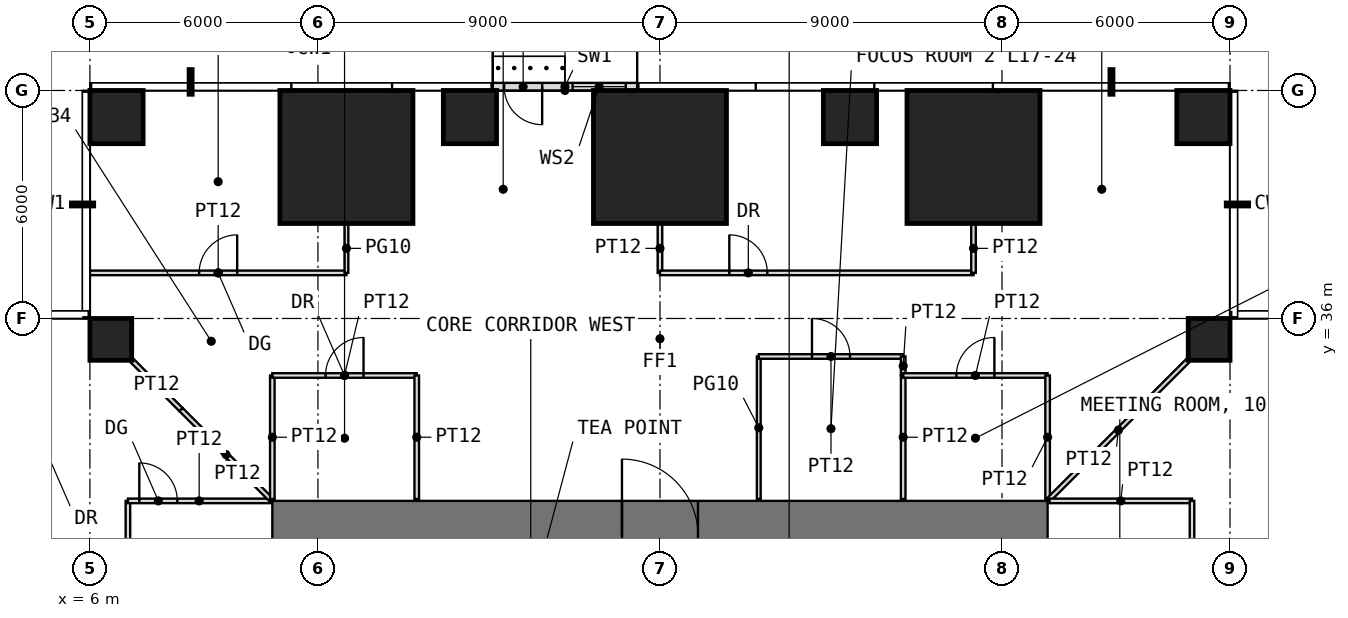
"""IFC4 building model, lengths in metres.
Left out: names, types, materials, properties, quantities, classifications, styles, units other than length and angle.
Written with IfcOpenShell. Run it as: python <this file> out.ifc"""

import sys

from ifc_helpers import new_model, si_unit, direction, frame, frame_2d, origin, origin_2d, place, context, subcontext, project, spatial, rectangle, extrude, element, fill, save


model = new_model("IFC4")
c1 = context("Model", 3, precision=1e-05, world=origin(), true_north=direction((0.0, 1.0)))
c2 = subcontext(c1, "Body", "Model", "MODEL_VIEW")
j1 = project(units=[si_unit("LENGTHUNIT", "METRE"), si_unit("PLANEANGLEUNIT", "RADIAN")], contexts=[c1])
p1 = place(None, origin())
s1 = spatial("IfcSite", under=j1, at=p1, CompositionType="ELEMENT")
p2 = place(p1, origin())
s2 = spatial("IfcBuilding", under=s1, at=p2, CompositionType="ELEMENT")
p3 = place(p2, frame((0.0, 0.0, 74.5)))
s3 = spatial("IfcBuildingStorey", under=s2, at=p3, CompositionType="ELEMENT", Elevation=74.5)
for number, where, z_axis, x_axis in (
    (1, (6.55, 35.45, 0.0), (0.0, 0.0, 1.0), (1.0, 0.0, 0.0)),
    (2, (35.45, 35.45, 0.0), (0.0, 0.0, 1.0), (1.0, 0.0, 0.0)),
):
    element("IfcColumn", number, at=place(p3, frame(where, z_axis=z_axis, x_axis=x_axis)), inside=s3, PredefinedType="COLUMN", context=c2, shape_type="SweptSolid", body=[
        extrude(rectangle(XDim=1.1, YDim=1.1, at=origin_2d()), origin(), (0.0, 0.0, 1.0), 4.0),
    ])
p4 = place(p3, frame((6.7, 41.3, 0.0), z_axis=(0.0, 0.0, 1.0), x_axis=(1.0, 0.0, 0.0)))
e3 = element("IfcColumn", 3, at=p4, inside=s3, PredefinedType="COLUMN", context=c2, shape_type="SweptSolid", body=[
    extrude(rectangle(XDim=1.4, YDim=1.4, at=origin_2d()), origin(), (0.0, 0.0, 1.0), 4.0),
])
p5 = place(p3, frame((12.75, 40.25, 0.0), z_axis=(0.0, 0.0, 1.0), x_axis=(1.0, 0.0, 0.0)))
e4 = element("IfcColumn", 4, at=p5, inside=s3, PredefinedType="COLUMN", context=c2, shape_type="SweptSolid", body=[
    extrude(rectangle(XDim=3.5, YDim=3.5, at=origin_2d()), origin(), (0.0, 0.0, 1.0), 4.0),
])
p6 = place(p3, frame((16.0, 41.3, 0.0), z_axis=(0.0, 0.0, 1.0), x_axis=(1.0, 0.0, 0.0)))
e5 = element("IfcColumn", 5, at=p6, inside=s3, PredefinedType="COLUMN", context=c2, shape_type="SweptSolid", body=[
    extrude(rectangle(XDim=1.4, YDim=1.4, at=origin_2d()), origin(), (0.0, 0.0, 1.0), 4.0),
])
p7 = place(p3, frame((21.0, 40.25, 0.0), z_axis=(0.0, 0.0, 1.0), x_axis=(1.0, 0.0, 0.0)))
e6 = element("IfcColumn", 6, at=p7, inside=s3, PredefinedType="COLUMN", context=c2, shape_type="SweptSolid", body=[
    extrude(rectangle(XDim=3.5, YDim=3.5, at=origin_2d()), origin(), (0.0, 0.0, 1.0), 4.0),
])
p8 = place(p3, frame((26.0, 41.3, 0.0), z_axis=(0.0, 0.0, 1.0), x_axis=(1.0, 0.0, 0.0)))
e7 = element("IfcColumn", 7, at=p8, inside=s3, PredefinedType="COLUMN", context=c2, shape_type="SweptSolid", body=[
    extrude(rectangle(XDim=1.4, YDim=1.4, at=origin_2d()), origin(), (0.0, 0.0, 1.0), 4.0),
])
p9 = place(p3, frame((29.25, 40.25, 0.0), z_axis=(0.0, 0.0, 1.0), x_axis=(1.0, 0.0, 0.0)))
e8 = element("IfcColumn", 8, at=p9, inside=s3, PredefinedType="COLUMN", context=c2, shape_type="SweptSolid", body=[
    extrude(rectangle(XDim=3.5, YDim=3.5, at=origin_2d()), origin(), (0.0, 0.0, 1.0), 4.0),
])
p10 = place(p3, frame((35.3, 41.3, 0.0), z_axis=(0.0, 0.0, 1.0), x_axis=(1.0, 0.0, 0.0)))
e9 = element("IfcColumn", 9, at=p10, inside=s3, PredefinedType="COLUMN", context=c2, shape_type="SweptSolid", body=[
    extrude(rectangle(XDim=1.4, YDim=1.4, at=origin_2d()), origin(), (0.0, 0.0, 1.0), 4.0),
])
p11 = place(p3, frame((20.4, 42.1, 0.0), z_axis=(0.0, 0.0, 1.0), x_axis=(-1.0, 0.0, 0.0)))
e10 = element("IfcWall", 10, at=p11, inside=s3, PredefinedType="USERDEFINED", context=c2, shape_type="SweptSolid", body=[
    extrude(rectangle(XDim=3.8, YDim=0.2, at=frame_2d((1.9, 0.0))), origin(), (0.0, 0.0, 1.0), 3.75),
])
p12 = place(p11, frame((2.5, 0.0, 0.0)))
e11 = element("IfcOpeningElement", 11, at=p12, cuts=e10, PredefinedType="OPENING", context=c2, shape_type="SweptSolid", body=[
    extrude(rectangle(XDim=1.0, YDim=2.4, at=frame_2d((0.5, 1.2))), frame((0.0, 0.11, 0.0), z_axis=(0.0, -1.0, 0.0), x_axis=(1.0, 0.0, 0.0)), (0.0, 0.0, 1.0), 0.22),
])
p13 = place(p11, frame((0.3, 0.0, 0.3)))
e12 = element("IfcOpeningElement", 12, at=p13, cuts=e10, PredefinedType="OPENING", context=c2, shape_type="SweptSolid", body=[
    extrude(rectangle(XDim=1.4, YDim=2.7, at=frame_2d((0.7, 1.35))), frame((0.0, 0.11, 0.0), z_axis=(0.0, -1.0, 0.0), x_axis=(1.0, 0.0, 0.0)), (0.0, 0.0, 1.0), 0.22),
])
p14 = place(p3, frame((10.8, 30.3, -0.05), z_axis=(0.0, 0.0, 1.0), x_axis=(1.0, 0.0, 0.0)))
e13 = element("IfcWall", 13, at=p14, inside=s3, PredefinedType="SHEAR", context=c2, shape_type="SweptSolid", body=[
    extrude(rectangle(XDim=20.4, YDim=1.8, at=frame_2d((10.2, 0.0))), origin(), (0.0, 0.0, 1.0), 4.0),
])
p15 = place(p14, frame((9.2, 0.0, 0.05)))
e14 = element("IfcOpeningElement", 14, at=p15, cuts=e13, PredefinedType="OPENING", context=c2, shape_type="SweptSolid", body=[
    extrude(rectangle(XDim=2.0, YDim=2.2, at=frame_2d((1.0, 1.1))), frame((0.0, 0.91, 0.0), z_axis=(0.0, -1.0, 0.0), x_axis=(1.0, 0.0, 0.0)), (0.0, 0.0, 1.0), 1.82),
])
p16 = place(p3, frame((6.0, 37.2, 0.0), z_axis=(0.0, 0.0, 1.0), x_axis=(1.0, 0.0, 0.0)))
e15 = element("IfcWall", 15, at=p16, inside=s3, PredefinedType="PARTITIONING", context=c2, shape_type="SweptSolid", body=[
    extrude(rectangle(XDim=6.75, YDim=0.12, at=frame_2d((3.375, 0.0))), origin(), (0.0, 0.0, 1.0), 3.75),
])
p17 = place(p16, frame((2.875, 0.0, 0.0)))
e16 = element("IfcOpeningElement", 16, at=p17, cuts=e15, PredefinedType="OPENING", context=c2, shape_type="SweptSolid", body=[
    extrude(rectangle(XDim=1.0, YDim=2.4, at=frame_2d((0.5, 1.2))), frame((0.0, 0.07, 0.0), z_axis=(0.0, -1.0, 0.0), x_axis=(1.0, 0.0, 0.0)), (0.0, 0.0, 1.0), 0.14),
])
p18 = place(p3, frame((7.0, 28.4, 0.0), z_axis=(0.0, 0.0, 1.0), x_axis=(0.0, 1.0, 0.0)))
e17 = element("IfcWall", 17, at=p18, inside=s3, PredefinedType="PARTITIONING", context=c2, shape_type="SweptSolid", body=[
    extrude(rectangle(XDim=2.8, YDim=0.12, at=frame_2d((1.4, 0.0))), origin(), (0.0, 0.0, 1.0), 3.75),
])
p19 = place(p3, frame((7.0, 31.2, 0.0), z_axis=(0.0, 0.0, 1.0), x_axis=(1.0, 0.0, 0.0)))
e18 = element("IfcWall", 18, at=p19, inside=s3, PredefinedType="PARTITIONING", context=c2, shape_type="SweptSolid", body=[
    extrude(rectangle(XDim=3.75, YDim=0.12, at=frame_2d((1.875, 0.0))), origin(), (0.0, 0.0, 1.0), 3.75),
])
p20 = place(p19, frame((0.3, 0.0, 0.0)))
e19 = element("IfcOpeningElement", 19, at=p20, cuts=e18, PredefinedType="OPENING", context=c2, shape_type="SweptSolid", body=[
    extrude(rectangle(XDim=1.0, YDim=2.4, at=frame_2d((0.5, 1.2))), frame((0.0, 0.07, 0.0), z_axis=(0.0, -1.0, 0.0), x_axis=(1.0, 0.0, 0.0)), (0.0, 0.0, 1.0), 0.14),
])
p21 = place(p3, frame((7.11, 34.89, 0.0), z_axis=(0.0, 0.0, 1.0), x_axis=(0.707106781187, -0.707106781187, 0.0)))
e20 = element("IfcWall", 20, at=p21, inside=s3, PredefinedType="PARTITIONING", context=c2, shape_type="SweptSolid", body=[
    extrude(rectangle(XDim=1.822, YDim=0.12, at=frame_2d((0.911, 0.0))), origin(), (0.0, 0.0, 1.0), 3.75),
])
p22 = place(p3, frame((8.398, 33.602, 0.0), z_axis=(0.0, 0.0, 1.0), x_axis=(0.707106781187, -0.707106781187, 0.0)))
e21 = element("IfcWall", 21, at=p22, inside=s3, PredefinedType="PARTITIONING", context=c2, shape_type="SweptSolid", body=[
    extrude(rectangle(XDim=3.346, YDim=0.12, at=frame_2d((1.673, 0.0))), origin(), (0.0, 0.0, 1.0), 3.75),
])
p23 = place(p3, frame((10.8, 31.25, 0.0), z_axis=(0.0, 0.0, 1.0), x_axis=(0.0, 1.0, 0.0)))
e22 = element("IfcWall", 22, at=p23, inside=s3, PredefinedType="PARTITIONING", context=c2, shape_type="SweptSolid", body=[
    extrude(rectangle(XDim=3.25, YDim=0.12, at=frame_2d((1.625, 0.0))), origin(), (0.0, 0.0, 1.0), 3.75),
])
p24 = place(p3, frame((10.8, 34.5, 0.0), z_axis=(0.0, 0.0, 1.0), x_axis=(1.0, 0.0, 0.0)))
e23 = element("IfcWall", 23, at=p24, inside=s3, PredefinedType="PARTITIONING", context=c2, shape_type="SweptSolid", body=[
    extrude(rectangle(XDim=3.8, YDim=0.12, at=frame_2d((1.9, 0.0))), origin(), (0.0, 0.0, 1.0), 3.75),
])
p25 = place(p24, frame((1.4, 0.0, 0.0)))
e24 = element("IfcOpeningElement", 24, at=p25, cuts=e23, PredefinedType="OPENING", context=c2, shape_type="SweptSolid", body=[
    extrude(rectangle(XDim=1.0, YDim=2.2, at=frame_2d((0.5, 1.1))), frame((0.0, 0.07, 0.0), z_axis=(0.0, -1.0, 0.0), x_axis=(1.0, 0.0, 0.0)), (0.0, 0.0, 1.0), 0.14),
])
p26 = place(p3, frame((12.75, 37.2, 0.0), z_axis=(0.0, 0.0, 1.0), x_axis=(0.0, 1.0, 0.0)))
e25 = element("IfcWall", 25, at=p26, inside=s3, PredefinedType="PARTITIONING", context=c2, shape_type="SweptSolid", body=[
    extrude(rectangle(XDim=1.29, YDim=0.1, at=frame_2d((0.645, 0.0))), origin(), (0.0, 0.0, 1.0), 3.75),
])
p27 = place(p3, frame((14.6, 31.25, 0.0), z_axis=(0.0, 0.0, 1.0), x_axis=(0.0, 1.0, 0.0)))
e26 = element("IfcWall", 26, at=p27, inside=s3, PredefinedType="PARTITIONING", context=c2, shape_type="SweptSolid", body=[
    extrude(rectangle(XDim=3.25, YDim=0.12, at=frame_2d((1.625, 0.0))), origin(), (0.0, 0.0, 1.0), 3.75),
])
p28 = place(p3, frame((21.0, 37.2, 0.0), z_axis=(0.0, 0.0, 1.0), x_axis=(0.0, 1.0, 0.0)))
e27 = element("IfcWall", 27, at=p28, inside=s3, PredefinedType="PARTITIONING", context=c2, shape_type="SweptSolid", body=[
    extrude(rectangle(XDim=1.29, YDim=0.12, at=frame_2d((0.645, 0.0))), origin(), (0.0, 0.0, 1.0), 3.75),
])
p29 = place(p3, frame((21.0, 37.2, 0.0), z_axis=(0.0, 0.0, 1.0), x_axis=(1.0, 0.0, 0.0)))
e28 = element("IfcWall", 28, at=p29, inside=s3, PredefinedType="PARTITIONING", context=c2, shape_type="SweptSolid", body=[
    extrude(rectangle(XDim=8.25, YDim=0.12, at=frame_2d((4.125, 0.0))), origin(), (0.0, 0.0, 1.0), 3.75),
])
p30 = place(p29, frame((1.825, 0.0, 0.0)))
e29 = element("IfcOpeningElement", 29, at=p30, cuts=e28, PredefinedType="OPENING", context=c2, shape_type="SweptSolid", body=[
    extrude(rectangle(XDim=1.0, YDim=2.2, at=frame_2d((0.5, 1.1))), frame((0.0, 0.07, 0.0), z_axis=(0.0, -1.0, 0.0), x_axis=(1.0, 0.0, 0.0)), (0.0, 0.0, 1.0), 0.14),
])
p31 = place(p3, frame((23.6, 31.25, 0.0), z_axis=(0.0, 0.0, 1.0), x_axis=(0.0, 1.0, 0.0)))
e30 = element("IfcWall", 30, at=p31, inside=s3, PredefinedType="PARTITIONING", context=c2, shape_type="SweptSolid", body=[
    extrude(rectangle(XDim=3.75, YDim=0.1, at=frame_2d((1.875, 0.0))), origin(), (0.0, 0.0, 1.0), 3.75),
])
p32 = place(p3, frame((23.6, 35.0, 0.0), z_axis=(0.0, 0.0, 1.0), x_axis=(1.0, 0.0, 0.0)))
e31 = element("IfcWall", 31, at=p32, inside=s3, PredefinedType="PARTITIONING", context=c2, shape_type="SweptSolid", body=[
    extrude(rectangle(XDim=3.8, YDim=0.12, at=frame_2d((1.9, 0.0))), origin(), (0.0, 0.0, 1.0), 3.75),
])
p33 = place(p32, frame((1.4, 0.0, 0.0)))
e32 = element("IfcOpeningElement", 32, at=p33, cuts=e31, PredefinedType="OPENING", context=c2, shape_type="SweptSolid", body=[
    extrude(rectangle(XDim=1.0, YDim=2.4, at=frame_2d((0.5, 1.2))), frame((0.0, 0.07, 0.0), z_axis=(0.0, -1.0, 0.0), x_axis=(1.0, 0.0, 0.0)), (0.0, 0.0, 1.0), 0.14),
])
p34 = place(p3, frame((27.4, 31.25, 0.0), z_axis=(0.0, 0.0, 1.0), x_axis=(0.0, 1.0, 0.0)))
e33 = element("IfcWall", 33, at=p34, inside=s3, PredefinedType="PARTITIONING", context=c2, shape_type="SweptSolid", body=[
    extrude(rectangle(XDim=3.25, YDim=0.12, at=frame_2d((1.625, 0.0))), origin(), (0.0, 0.0, 1.0), 3.75),
])
p35 = place(p3, frame((27.4, 34.5, 0.0), z_axis=(0.0, 0.0, 1.0), x_axis=(0.0, 1.0, 0.0)))
e34 = element("IfcWall", 34, at=p35, inside=s3, PredefinedType="PARTITIONING", context=c2, shape_type="SweptSolid", body=[
    extrude(rectangle(XDim=0.5, YDim=0.12, at=frame_2d((0.25, 0.0))), origin(), (0.0, 0.0, 1.0), 3.75),
])
p36 = place(p3, frame((27.4, 34.5, 0.0), z_axis=(0.0, 0.0, 1.0), x_axis=(1.0, 0.0, 0.0)))
e35 = element("IfcWall", 35, at=p36, inside=s3, PredefinedType="PARTITIONING", context=c2, shape_type="SweptSolid", body=[
    extrude(rectangle(XDim=3.8, YDim=0.12, at=frame_2d((1.9, 0.0))), origin(), (0.0, 0.0, 1.0), 3.75),
])
p37 = place(p36, frame((1.4, 0.0, 0.0)))
e36 = element("IfcOpeningElement", 36, at=p37, cuts=e35, PredefinedType="OPENING", context=c2, shape_type="SweptSolid", body=[
    extrude(rectangle(XDim=1.0, YDim=2.2, at=frame_2d((0.5, 1.1))), frame((0.0, 0.07, 0.0), z_axis=(0.0, -1.0, 0.0), x_axis=(1.0, 0.0, 0.0)), (0.0, 0.0, 1.0), 0.14),
])
p38 = place(p3, frame((29.25, 37.2, 0.0), z_axis=(0.0, 0.0, 1.0), x_axis=(0.0, 1.0, 0.0)))
e37 = element("IfcWall", 37, at=p38, inside=s3, PredefinedType="PARTITIONING", context=c2, shape_type="SweptSolid", body=[
    extrude(rectangle(XDim=1.29, YDim=0.12, at=frame_2d((0.645, 0.0))), origin(), (0.0, 0.0, 1.0), 3.75),
])
p39 = place(p3, frame((31.2, 31.25, 0.0), z_axis=(0.0, 0.0, 1.0), x_axis=(0.0, 1.0, 0.0)))
e38 = element("IfcWall", 38, at=p39, inside=s3, PredefinedType="PARTITIONING", context=c2, shape_type="SweptSolid", body=[
    extrude(rectangle(XDim=3.25, YDim=0.12, at=frame_2d((1.625, 0.0))), origin(), (0.0, 0.0, 1.0), 3.75),
])
p40 = place(p3, frame((31.235, 31.235, 0.0), z_axis=(0.0, 0.0, 1.0), x_axis=(0.707106781187, 0.707106781187, 0.0)))
e39 = element("IfcWall", 39, at=p40, inside=s3, PredefinedType="PARTITIONING", context=c2, shape_type="SweptSolid", body=[
    extrude(rectangle(XDim=5.168, YDim=0.12, at=frame_2d((2.584, 0.0))), origin(), (0.0, 0.0, 1.0), 3.75),
])
p41 = place(p3, frame((31.25, 31.2, 0.0), z_axis=(0.0, 0.0, 1.0), x_axis=(1.0, 0.0, 0.0)))
e40 = element("IfcWall", 40, at=p41, inside=s3, PredefinedType="PARTITIONING", context=c2, shape_type="SweptSolid", body=[
    extrude(rectangle(XDim=3.75, YDim=0.12, at=frame_2d((1.875, 0.0))), origin(), (0.0, 0.0, 1.0), 3.75),
])
p42 = place(p3, frame((35.0, 24.4, 0.0), z_axis=(0.0, 0.0, 1.0), x_axis=(0.0, 1.0, 0.0)))
e41 = element("IfcWall", 41, at=p42, inside=s3, PredefinedType="PARTITIONING", context=c2, shape_type="SweptSolid", body=[
    extrude(rectangle(XDim=6.8, YDim=0.12, at=frame_2d((3.4, 0.0))), origin(), (0.0, 0.0, 1.0), 3.75),
])
p43 = place(p42, frame((2.9, 0.0, 0.0)))
e42 = element("IfcOpeningElement", 42, at=p43, cuts=e41, PredefinedType="OPENING", context=c2, shape_type="SweptSolid", body=[
    extrude(rectangle(XDim=1.0, YDim=2.4, at=frame_2d((0.5, 1.2))), frame((0.0, 0.07, 0.0), z_axis=(0.0, -1.0, 0.0), x_axis=(1.0, 0.0, 0.0)), (0.0, 0.0, 1.0), 0.14),
])
p44 = place(p12, origin())
e43 = element("IfcDoor", 43, at=p44, inside=s3, OperationType="SINGLE_SWING_LEFT", PredefinedType="DOOR", context=c2, shape_type="SweptSolid", body=[
    extrude(rectangle(XDim=1.0, YDim=2.4, at=frame_2d((0.5, 1.2))), frame((0.0, 0.025, 0.0), z_axis=(0.0, -1.0, 0.0), x_axis=(1.0, 0.0, 0.0)), (0.0, 0.0, 1.0), 0.05),
])
fill(e11, e43)
p45 = place(p13, origin())
e44 = element("IfcWindow", 44, at=p45, inside=s3, PartitioningType="SINGLE_PANEL", PredefinedType="WINDOW", context=c2, shape_type="SweptSolid", body=[
    extrude(rectangle(XDim=1.4, YDim=2.7, at=frame_2d((0.7, 1.35))), frame((0.0, 0.03, 0.0), z_axis=(0.0, -1.0, 0.0), x_axis=(1.0, 0.0, 0.0)), (0.0, 0.0, 1.0), 0.06),
])
fill(e12, e44)
p46 = place(p15, origin())
e45 = element("IfcDoor", 45, at=p46, inside=s3, OperationType="DOUBLE_DOOR_SINGLE_SWING", PredefinedType="DOOR", context=c2, shape_type="SweptSolid", body=[
    extrude(rectangle(XDim=2.0, YDim=2.2, at=frame_2d((1.0, 1.1))), frame((0.0, 0.025, 0.0), z_axis=(0.0, -1.0, 0.0), x_axis=(1.0, 0.0, 0.0)), (0.0, 0.0, 1.0), 0.05),
])
fill(e14, e45)
p47 = place(p25, origin())
e46 = element("IfcDoor", 46, at=p47, inside=s3, OperationType="SINGLE_SWING_RIGHT", PredefinedType="DOOR", context=c2, shape_type="SweptSolid", body=[
    extrude(rectangle(XDim=1.0, YDim=2.2, at=frame_2d((0.5, 1.1))), frame((0.0, 0.025, 0.0), z_axis=(0.0, -1.0, 0.0), x_axis=(1.0, 0.0, 0.0)), (0.0, 0.0, 1.0), 0.05),
])
fill(e24, e46)
p48 = place(p33, origin())
e47 = element("IfcDoor", 47, at=p48, inside=s3, OperationType="SINGLE_SWING_LEFT", PredefinedType="DOOR", context=c2, shape_type="SweptSolid", body=[
    extrude(rectangle(XDim=1.0, YDim=2.4, at=frame_2d((0.5, 1.2))), frame((0.0, 0.025, 0.0), z_axis=(0.0, -1.0, 0.0), x_axis=(1.0, 0.0, 0.0)), (0.0, 0.0, 1.0), 0.05),
])
fill(e32, e47)
p49 = place(p37, origin())
e48 = element("IfcDoor", 48, at=p49, inside=s3, OperationType="SINGLE_SWING_RIGHT", PredefinedType="DOOR", context=c2, shape_type="SweptSolid", body=[
    extrude(rectangle(XDim=1.0, YDim=2.2, at=frame_2d((0.5, 1.1))), frame((0.0, 0.025, 0.0), z_axis=(0.0, -1.0, 0.0), x_axis=(1.0, 0.0, 0.0)), (0.0, 0.0, 1.0), 0.05),
])
fill(e36, e48)
p50 = place(p17, origin())
e49 = element("IfcDoor", 49, at=p50, inside=s3, OperationType="SINGLE_SWING_RIGHT", PredefinedType="DOOR", context=c2, shape_type="SweptSolid", body=[
    extrude(rectangle(XDim=1.0, YDim=2.4, at=frame_2d((0.5, 1.2))), frame((0.0, 0.025, 0.0), z_axis=(0.0, -1.0, 0.0), x_axis=(1.0, 0.0, 0.0)), (0.0, 0.0, 1.0), 0.05),
])
fill(e16, e49)
p51 = place(p30, origin())
e50 = element("IfcDoor", 50, at=p51, inside=s3, OperationType="SINGLE_SWING_LEFT", PredefinedType="DOOR", context=c2, shape_type="SweptSolid", body=[
    extrude(rectangle(XDim=1.0, YDim=2.2, at=frame_2d((0.5, 1.1))), frame((0.0, 0.025, 0.0), z_axis=(0.0, -1.0, 0.0), x_axis=(1.0, 0.0, 0.0)), (0.0, 0.0, 1.0), 0.05),
])
fill(e29, e50)
p52 = place(p20, origin())
e51 = element("IfcDoor", 51, at=p52, inside=s3, OperationType="SINGLE_SWING_LEFT", PredefinedType="DOOR", context=c2, shape_type="SweptSolid", body=[
    extrude(rectangle(XDim=1.0, YDim=2.4, at=frame_2d((0.5, 1.2))), frame((0.0, 0.025, 0.0), z_axis=(0.0, -1.0, 0.0), x_axis=(1.0, 0.0, 0.0)), (0.0, 0.0, 1.0), 0.05),
])
fill(e19, e51)
save(model, sys.argv[1])
